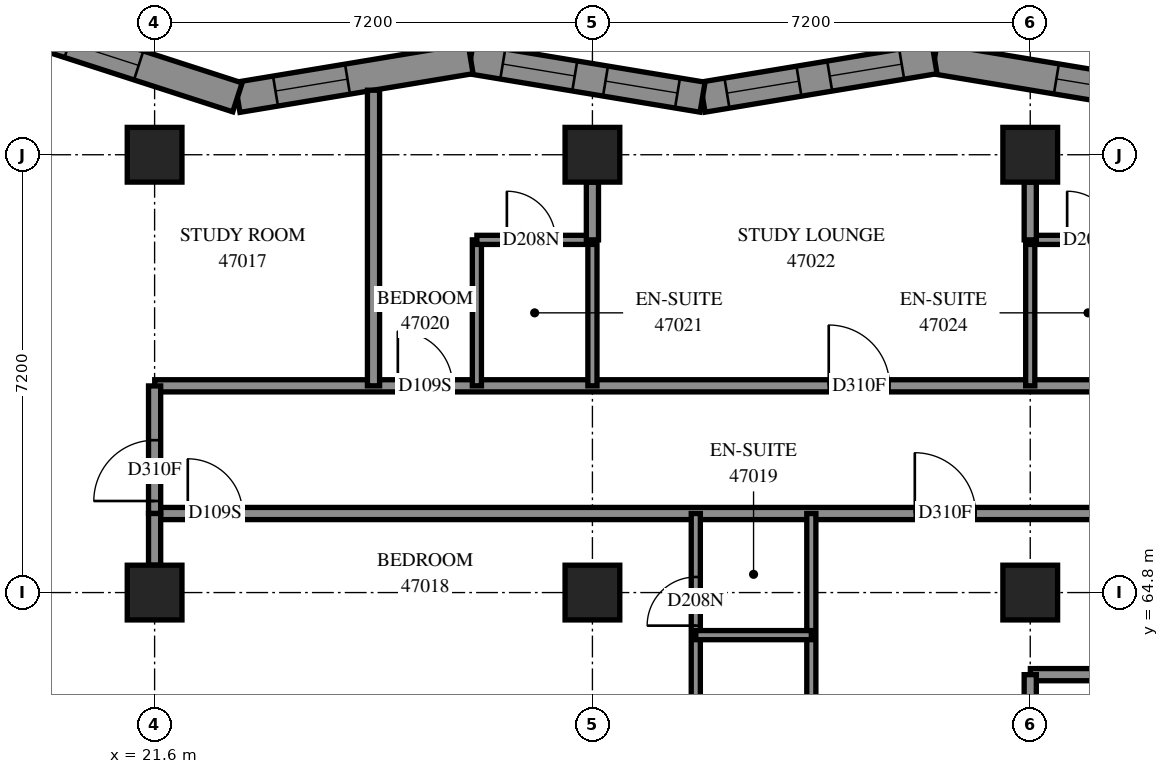
"""IFC4 building model, lengths in metres.
Left out: names, types, materials, properties, quantities, classifications, styles, units other than length and angle.
Written with IfcOpenShell. Run it as: python <this file> out.ifc"""

import sys

from ifc_helpers import new_model, si_unit, direction, frame, frame_2d, origin, origin_2d, place, context, subcontext, project, spatial, polyline, rectangle, outline, extrude, element, fill, save


model = new_model("IFC4")
c1 = context("Model", 3, precision=1e-05, world=origin(), true_north=direction((0.0, 1.0)))
c2 = subcontext(c1, "Body", "Model", "MODEL_VIEW")
j1 = project(units=[si_unit("LENGTHUNIT", "METRE"), si_unit("PLANEANGLEUNIT", "RADIAN")], contexts=[c1])
p1 = place(None, origin())
s1 = spatial("IfcSite", under=j1, at=p1, CompositionType="ELEMENT")
p2 = place(p1, origin())
s2 = spatial("IfcBuilding", under=s1, at=p2, CompositionType="ELEMENT")
p3 = place(p2, frame((0.0, 0.0, 172.8)))
s3 = spatial("IfcBuildingStorey", under=s2, at=p3, CompositionType="ELEMENT", Elevation=172.8)
for number, where, z_axis, x_axis in (
    (1, (21.6, 64.8, 0.0), (0.0, 0.0, 1.0), (1.0, 0.0, 0.0)),
    (2, (21.6, 72.0, 0.0), (0.0, 0.0, 1.0), (1.0, 0.0, 0.0)),
    (3, (28.8, 64.8, 0.0), (0.0, 0.0, 1.0), (1.0, 0.0, 0.0)),
    (4, (28.8, 72.0, 0.0), (0.0, 0.0, 1.0), (1.0, 0.0, 0.0)),
    (5, (36.0, 64.8, 0.0), (0.0, 0.0, 1.0), (1.0, 0.0, 0.0)),
    (6, (36.0, 72.0, 0.0), (0.0, 0.0, 1.0), (1.0, 0.0, 0.0)),
):
    element("IfcColumn", number, at=place(p3, frame(where, z_axis=z_axis, x_axis=x_axis)), inside=s3, PredefinedType="COLUMN", context=c2, shape_type="SweptSolid", body=[
        extrude(rectangle(XDim=0.9, YDim=0.9, at=origin_2d()), origin(), (0.0, 0.0, 1.0), 3.1),
    ])
p4 = place(p3, frame((38.241, 72.947, 0.0), z_axis=(0.0, 0.0, 1.0), x_axis=(-0.9865110911, 0.1636944324, 0.0)))
e7 = element("IfcWall", 7, at=p4, inside=s3, PredefinedType="SOLIDWALL", context=c2, shape_type="SweptSolid", body=[
    extrude(outline(polyline([(0.042, -0.25), (3.908, -0.25), (3.825, 0.25), (-0.042, 0.25), (0.042, -0.25)])), origin(), (0.0, 0.0, 1.0), 3.1),
])
p5 = place(p4, frame((0.636, 0.0, 0.45)))
e8 = element("IfcOpeningElement", 8, at=p5, cuts=e7, PredefinedType="OPENING", context=c2, shape_type="SweptSolid", body=[
    extrude(rectangle(XDim=1.2, YDim=2.5, at=frame_2d((0.6, 1.25))), frame((0.0, 0.26, 0.0), z_axis=(0.0, -1.0, 0.0), x_axis=(1.0, 0.0, 0.0)), (0.0, 0.0, 1.0), 0.52),
])
p6 = place(p3, frame((34.426, 73.58, 0.0), z_axis=(0.0, 0.0, 1.0), x_axis=(-0.9865103981, -0.1636986085, 0.0)))
e9 = element("IfcWall", 9, at=p6, inside=s3, PredefinedType="SOLIDWALL", context=c2, shape_type="SweptSolid", body=[
    extrude(outline(polyline([(-0.042, -0.25), (3.825, -0.25), (3.908, 0.25), (0.042, 0.25), (-0.042, -0.25)])), origin(), (0.0, 0.0, 1.0), 3.1),
])
p7 = place(p6, frame((0.548, 0.0, 0.45)))
e10 = element("IfcOpeningElement", 10, at=p7, cuts=e9, PredefinedType="OPENING", context=c2, shape_type="SweptSolid", body=[
    extrude(rectangle(XDim=1.2, YDim=2.5, at=frame_2d((0.6, 1.25))), frame((0.0, 0.26, 0.0), z_axis=(0.0, -1.0, 0.0), x_axis=(1.0, 0.0, 0.0)), (0.0, 0.0, 1.0), 0.52),
])
p8 = place(p6, frame((2.26, 0.0, 0.45)))
e11 = element("IfcOpeningElement", 11, at=p8, cuts=e9, PredefinedType="OPENING", context=c2, shape_type="SweptSolid", body=[
    extrude(rectangle(XDim=1.2, YDim=2.5, at=frame_2d((0.6, 1.25))), frame((0.0, 0.26, 0.0), z_axis=(0.0, -1.0, 0.0), x_axis=(1.0, 0.0, 0.0)), (0.0, 0.0, 1.0), 0.52),
])
p9 = place(p3, frame((30.611, 72.947, 0.0), z_axis=(0.0, 0.0, 1.0), x_axis=(-0.9865110911, 0.1636944324, 0.0)))
e12 = element("IfcWall", 12, at=p9, inside=s3, PredefinedType="SOLIDWALL", context=c2, shape_type="SweptSolid", body=[
    extrude(outline(polyline([(0.042, -0.25), (3.908, -0.25), (3.825, 0.25), (-0.042, 0.25), (0.042, -0.25)])), origin(), (0.0, 0.0, 1.0), 3.1),
])
p10 = place(p9, frame((0.418, 0.0, 0.45)))
e13 = element("IfcOpeningElement", 13, at=p10, cuts=e12, PredefinedType="OPENING", context=c2, shape_type="SweptSolid", body=[
    extrude(rectangle(XDim=1.2, YDim=2.5, at=frame_2d((0.6, 1.25))), frame((0.0, 0.26, 0.0), z_axis=(0.0, -1.0, 0.0), x_axis=(1.0, 0.0, 0.0)), (0.0, 0.0, 1.0), 0.52),
])
p11 = place(p9, frame((2.131, 0.0, 0.45)))
e14 = element("IfcOpeningElement", 14, at=p11, cuts=e12, PredefinedType="OPENING", context=c2, shape_type="SweptSolid", body=[
    extrude(rectangle(XDim=1.2, YDim=2.5, at=frame_2d((0.6, 1.25))), frame((0.0, 0.26, 0.0), z_axis=(0.0, -1.0, 0.0), x_axis=(1.0, 0.0, 0.0)), (0.0, 0.0, 1.0), 0.52),
])
p12 = place(p3, frame((26.797, 73.58, 0.0), z_axis=(0.0, 0.0, 1.0), x_axis=(-0.986509816, -0.1637021166, 0.0)))
e15 = element("IfcWall", 15, at=p12, inside=s3, PredefinedType="SOLIDWALL", context=c2, shape_type="SweptSolid", body=[
    extrude(outline(polyline([(-0.042, -0.25), (3.825, -0.25), (3.947, 0.25), (0.042, 0.25), (-0.042, -0.25)])), origin(), (0.0, 0.0, 1.0), 3.1),
])
p13 = place(p12, frame((2.052, 0.0, 0.45)))
e16 = element("IfcOpeningElement", 16, at=p13, cuts=e15, PredefinedType="OPENING", context=c2, shape_type="SweptSolid", body=[
    extrude(rectangle(XDim=1.2, YDim=2.5, at=frame_2d((0.6, 1.25))), frame((0.0, 0.26, 0.0), z_axis=(0.0, -1.0, 0.0), x_axis=(1.0, 0.0, 0.0)), (0.0, 0.0, 1.0), 0.52),
])
p14 = place(p3, frame((22.963, 72.943, 0.0), z_axis=(0.0, 0.0, 1.0), x_axis=(-0.9515260861, 0.3075680535, 0.0)))
e17 = element("IfcWall", 17, at=p14, inside=s3, PredefinedType="SOLIDWALL", context=c2, shape_type="SweptSolid", body=[
    extrude(outline(polyline([(0.061, -0.25), (4.07, -0.25), (3.383, 0.25), (-0.061, 0.25), (0.061, -0.25)])), origin(), (0.0, 0.0, 1.0), 3.1),
])
p15 = place(p14, frame((1.708, 0.0, 0.45)))
e18 = element("IfcOpeningElement", 18, at=p15, cuts=e17, PredefinedType="OPENING", context=c2, shape_type="SweptSolid", body=[
    extrude(rectangle(XDim=1.2, YDim=2.5, at=frame_2d((0.6, 1.25))), frame((0.0, 0.26, 0.0), z_axis=(0.0, -1.0, 0.0), x_axis=(1.0, 0.0, 0.0)), (0.0, 0.0, 1.0), 0.52),
])
p16 = place(p3, frame((21.602, 68.2, 0.0), z_axis=(0.0, 0.0, 1.0), x_axis=(1.0, 0.0, 0.0)))
e19 = element("IfcWall", 19, at=p16, inside=s3, PredefinedType="PARTITIONING", context=c2, shape_type="SweptSolid", body=[
    extrude(rectangle(XDim=19.048, YDim=0.2, at=frame_2d((9.524, 0.0))), origin(), (0.0, 0.0, 1.0), 3.1),
])
p17 = place(p16, frame((3.998, 0.0, 0.0)))
e20 = element("IfcOpeningElement", 20, at=p17, cuts=e19, PredefinedType="OPENING", context=c2, shape_type="SweptSolid", body=[
    extrude(rectangle(XDim=0.9, YDim=2.1, at=frame_2d((0.45, 1.05))), frame((0.0, 0.11, 0.0), z_axis=(0.0, -1.0, 0.0), x_axis=(1.0, 0.0, 0.0)), (0.0, 0.0, 1.0), 0.22),
])
p18 = place(p16, frame((11.084, 0.0, 0.0)))
e21 = element("IfcOpeningElement", 21, at=p18, cuts=e19, PredefinedType="OPENING", context=c2, shape_type="SweptSolid", body=[
    extrude(rectangle(XDim=1.0, YDim=2.1, at=frame_2d((0.5, 1.05))), frame((0.0, 0.11, 0.0), z_axis=(0.0, -1.0, 0.0), x_axis=(1.0, 0.0, 0.0)), (0.0, 0.0, 1.0), 0.22),
])
p19 = place(p16, frame((16.748, 0.0, 0.0)))
e22 = element("IfcOpeningElement", 22, at=p19, cuts=e19, PredefinedType="OPENING", context=c2, shape_type="SweptSolid", body=[
    extrude(rectangle(XDim=0.9, YDim=2.1, at=frame_2d((0.45, 1.05))), frame((0.0, 0.11, 0.0), z_axis=(0.0, -1.0, 0.0), x_axis=(1.0, 0.0, 0.0)), (0.0, 0.0, 1.0), 0.22),
])
p20 = place(p3, frame((21.6, 66.1, 0.0), z_axis=(0.0, 0.0, 1.0), x_axis=(1.0, 0.0, 0.0)))
e23 = element("IfcWall", 23, at=p20, inside=s3, PredefinedType="PARTITIONING", context=c2, shape_type="SweptSolid", body=[
    extrude(rectangle(XDim=16.95, YDim=0.2, at=frame_2d((8.475, 0.0))), origin(), (0.0, 0.0, 1.0), 3.1),
])
p21 = place(p20, frame((0.546, 0.0, 0.0)))
e24 = element("IfcOpeningElement", 24, at=p21, cuts=e23, PredefinedType="OPENING", context=c2, shape_type="SweptSolid", body=[
    extrude(rectangle(XDim=0.9, YDim=2.1, at=frame_2d((0.45, 1.05))), frame((0.0, 0.11, 0.0), z_axis=(0.0, -1.0, 0.0), x_axis=(1.0, 0.0, 0.0)), (0.0, 0.0, 1.0), 0.22),
])
p22 = place(p20, frame((12.502, 0.0, 0.0)))
e25 = element("IfcOpeningElement", 25, at=p22, cuts=e23, PredefinedType="OPENING", context=c2, shape_type="SweptSolid", body=[
    extrude(rectangle(XDim=1.0, YDim=2.1, at=frame_2d((0.5, 1.05))), frame((0.0, 0.11, 0.0), z_axis=(0.0, -1.0, 0.0), x_axis=(1.0, 0.0, 0.0)), (0.0, 0.0, 1.0), 0.22),
])
p23 = place(p3, frame((25.2, 68.2, 0.0), z_axis=(0.0, 0.0, 1.0), x_axis=(0.0, 1.0, 0.0)))
e26 = element("IfcWall", 26, at=p23, inside=s3, PredefinedType="PARTITIONING", context=c2, shape_type="SweptSolid", body=[
    extrude(rectangle(XDim=4.861, YDim=0.2, at=frame_2d((2.431, 0.0))), origin(), (0.0, 0.0, 1.0), 3.1),
])
p24 = place(p3, frame((32.4, 62.867, 0.0), z_axis=(0.0, 0.0, 1.0), x_axis=(0.0, 1.0, 0.0)))
e27 = element("IfcWall", 27, at=p24, inside=s3, PredefinedType="PARTITIONING", context=c2, shape_type="SweptSolid", body=[
    extrude(rectangle(XDim=3.233, YDim=0.15, at=frame_2d((1.617, 0.0))), origin(), (0.0, 0.0, 1.0), 3.1),
])
p25 = place(p3, frame((30.5, 62.867, 0.0), z_axis=(0.0, 0.0, 1.0), x_axis=(0.0, 1.0, 0.0)))
e28 = element("IfcWall", 28, at=p25, inside=s3, PredefinedType="PARTITIONING", context=c2, shape_type="SweptSolid", body=[
    extrude(rectangle(XDim=3.233, YDim=0.15, at=frame_2d((1.617, 0.0))), origin(), (0.0, 0.0, 1.0), 3.1),
])
p26 = place(p25, frame((1.389, 0.0, 0.0)))
e29 = element("IfcOpeningElement", 29, at=p26, cuts=e28, PredefinedType="OPENING", context=c2, shape_type="SweptSolid", body=[
    extrude(rectangle(XDim=0.8, YDim=2.1, at=frame_2d((0.4, 1.05))), frame((0.0, 0.085, 0.0), z_axis=(0.0, -1.0, 0.0), x_axis=(1.0, 0.0, 0.0)), (0.0, 0.0, 1.0), 0.17),
])
p27 = place(p3, frame((36.002, 63.45, 0.0), z_axis=(0.0, 0.0, 1.0), x_axis=(1.0, 0.0, 0.0)))
e30 = element("IfcWall", 30, at=p27, inside=s3, PredefinedType="PARTITIONING", context=c2, shape_type="SweptSolid", body=[
    extrude(rectangle(XDim=2.548, YDim=0.2, at=frame_2d((1.274, 0.0))), origin(), (0.0, 0.0, 1.0), 3.1),
])
for number, where, z_axis, x_axis in (
    (31, (26.9, 68.2, 0.0), (0.0, 0.0, 1.0), (0.0, 1.0, 0.0)),
    (32, (28.8, 68.2, 0.0), (0.0, 0.0, 1.0), (0.0, 1.0, 0.0)),
    (33, (36.0, 68.2, 0.0), (0.0, 0.0, 1.0), (0.0, 1.0, 0.0)),
):
    element("IfcWall", number, at=place(p3, frame(where, z_axis=z_axis, x_axis=x_axis)), inside=s3, PredefinedType="PARTITIONING", context=c2, shape_type="SweptSolid", body=[
        extrude(rectangle(XDim=2.4, YDim=0.15, at=frame_2d((1.2, 0.0))), origin(), (0.0, 0.0, 1.0), 3.1),
    ])
p28 = place(p3, frame((36.0, 61.35, 0.0), z_axis=(0.0, 0.0, 1.0), x_axis=(0.0, 1.0, 0.0)))
e34 = element("IfcWall", 34, at=p28, inside=s3, PredefinedType="PARTITIONING", context=c2, shape_type="SweptSolid", body=[
    extrude(rectangle(XDim=2.1, YDim=0.2, at=frame_2d((1.05, 0.0))), origin(), (0.0, 0.0, 1.0), 2.6),
])
p29 = place(p3, frame((21.6, 66.1, 0.0), z_axis=(0.0, 0.0, 1.0), x_axis=(0.0, 1.0, 0.0)))
e35 = element("IfcWall", 35, at=p29, inside=s3, PredefinedType="PARTITIONING", context=c2, shape_type="SweptSolid", body=[
    extrude(rectangle(XDim=2.098, YDim=0.2, at=frame_2d((1.049, 0.0))), origin(), (0.0, 0.0, 1.0), 2.6),
])
p30 = place(p29, frame((0.206, 0.0, 0.0)))
e36 = element("IfcOpeningElement", 36, at=p30, cuts=e35, PredefinedType="OPENING", context=c2, shape_type="SweptSolid", body=[
    extrude(rectangle(XDim=1.0, YDim=2.1, at=frame_2d((0.5, 1.05))), frame((0.0, 0.11, 0.0), z_axis=(0.0, -1.0, 0.0), x_axis=(1.0, 0.0, 0.0)), (0.0, 0.0, 1.0), 0.22),
])
p31 = place(p3, frame((26.9, 70.6, 0.0), z_axis=(0.0, 0.0, 1.0), x_axis=(1.0, 0.0, 0.0)))
e37 = element("IfcWall", 37, at=p31, inside=s3, PredefinedType="PARTITIONING", context=c2, shape_type="SweptSolid", body=[
    extrude(rectangle(XDim=1.9, YDim=0.15, at=frame_2d((0.95, 0.0))), origin(), (0.0, 0.0, 1.0), 3.1),
])
p32 = place(p31, frame((0.493, 0.0, 0.0)))
e38 = element("IfcOpeningElement", 38, at=p32, cuts=e37, PredefinedType="OPENING", context=c2, shape_type="SweptSolid", body=[
    extrude(rectangle(XDim=0.8, YDim=2.1, at=frame_2d((0.4, 1.05))), frame((0.0, 0.085, 0.0), z_axis=(0.0, -1.0, 0.0), x_axis=(1.0, 0.0, 0.0)), (0.0, 0.0, 1.0), 0.17),
])
p33 = place(p3, frame((36.0, 70.6, 0.0), z_axis=(0.0, 0.0, 1.0), x_axis=(1.0, 0.0, 0.0)))
e39 = element("IfcWall", 39, at=p33, inside=s3, PredefinedType="PARTITIONING", context=c2, shape_type="SweptSolid", body=[
    extrude(rectangle(XDim=1.9, YDim=0.15, at=frame_2d((0.95, 0.0))), origin(), (0.0, 0.0, 1.0), 3.1),
])
p34 = place(p33, frame((0.607, 0.0, 0.0)))
e40 = element("IfcOpeningElement", 40, at=p34, cuts=e39, PredefinedType="OPENING", context=c2, shape_type="SweptSolid", body=[
    extrude(rectangle(XDim=0.8, YDim=2.1, at=frame_2d((0.4, 1.05))), frame((0.0, 0.085, 0.0), z_axis=(0.0, -1.0, 0.0), x_axis=(1.0, 0.0, 0.0)), (0.0, 0.0, 1.0), 0.17),
])
p35 = place(p3, frame((30.5, 64.1, 0.0), z_axis=(0.0, 0.0, 1.0), x_axis=(1.0, 0.0, 0.0)))
e41 = element("IfcWall", 41, at=p35, inside=s3, PredefinedType="PARTITIONING", context=c2, shape_type="SweptSolid", body=[
    extrude(rectangle(XDim=1.9, YDim=0.15, at=frame_2d((0.95, 0.0))), origin(), (0.0, 0.0, 1.0), 3.1),
])
for number, where, z_axis, x_axis in (
    (42, (28.8, 70.6, 0.0), (0.0, 0.0, 1.0), (0.0, 1.0, 0.0)),
    (43, (36.0, 70.6, 0.0), (0.0, 0.0, 1.0), (0.0, 1.0, 0.0)),
):
    element("IfcWall", number, at=place(p3, frame(where, z_axis=z_axis, x_axis=x_axis)), inside=s3, PredefinedType="PARTITIONING", context=c2, shape_type="SweptSolid", body=[
        extrude(rectangle(XDim=0.95, YDim=0.2, at=frame_2d((0.475, 0.0))), origin(), (0.0, 0.0, 1.0), 3.1),
    ])
p36 = place(p3, frame((21.6, 65.25, 0.0), z_axis=(0.0, 0.0, 1.0), x_axis=(0.0, 1.0, 0.0)))
e44 = element("IfcWall", 44, at=p36, inside=s3, PredefinedType="PARTITIONING", context=c2, shape_type="SweptSolid", body=[
    extrude(rectangle(XDim=0.85, YDim=0.2, at=frame_2d((0.425, 0.0))), origin(), (0.0, 0.0, 1.0), 2.6),
])
p37 = place(p5, origin())
e45 = element("IfcWindow", 45, at=p37, inside=s3, PartitioningType="SINGLE_PANEL", PredefinedType="WINDOW", context=c2, shape_type="SweptSolid", body=[
    extrude(rectangle(XDim=1.2, YDim=2.5, at=frame_2d((0.6, 1.25))), frame((0.0, 0.18, 0.0), z_axis=(0.0, -1.0, 0.0), x_axis=(1.0, 0.0, 0.0)), (0.0, 0.0, 1.0), 0.06),
])
fill(e8, e45)
p38 = place(p7, origin())
e46 = element("IfcWindow", 46, at=p38, inside=s3, PartitioningType="SINGLE_PANEL", PredefinedType="WINDOW", context=c2, shape_type="SweptSolid", body=[
    extrude(rectangle(XDim=1.2, YDim=2.5, at=frame_2d((0.6, 1.25))), frame((0.0, 0.18, 0.0), z_axis=(0.0, -1.0, 0.0), x_axis=(1.0, 0.0, 0.0)), (0.0, 0.0, 1.0), 0.06),
])
fill(e10, e46)
p39 = place(p8, origin())
e47 = element("IfcWindow", 47, at=p39, inside=s3, PartitioningType="SINGLE_PANEL", PredefinedType="WINDOW", context=c2, shape_type="SweptSolid", body=[
    extrude(rectangle(XDim=1.2, YDim=2.5, at=frame_2d((0.6, 1.25))), frame((0.0, 0.18, 0.0), z_axis=(0.0, -1.0, 0.0), x_axis=(1.0, 0.0, 0.0)), (0.0, 0.0, 1.0), 0.06),
])
fill(e11, e47)
p40 = place(p10, origin())
e48 = element("IfcWindow", 48, at=p40, inside=s3, PartitioningType="SINGLE_PANEL", PredefinedType="WINDOW", context=c2, shape_type="SweptSolid", body=[
    extrude(rectangle(XDim=1.2, YDim=2.5, at=frame_2d((0.6, 1.25))), frame((0.0, 0.18, 0.0), z_axis=(0.0, -1.0, 0.0), x_axis=(1.0, 0.0, 0.0)), (0.0, 0.0, 1.0), 0.06),
])
fill(e13, e48)
p41 = place(p11, origin())
e49 = element("IfcWindow", 49, at=p41, inside=s3, PartitioningType="SINGLE_PANEL", PredefinedType="WINDOW", context=c2, shape_type="SweptSolid", body=[
    extrude(rectangle(XDim=1.2, YDim=2.5, at=frame_2d((0.6, 1.25))), frame((0.0, 0.18, 0.0), z_axis=(0.0, -1.0, 0.0), x_axis=(1.0, 0.0, 0.0)), (0.0, 0.0, 1.0), 0.06),
])
fill(e14, e49)
p42 = place(p13, origin())
e50 = element("IfcWindow", 50, at=p42, inside=s3, PartitioningType="SINGLE_PANEL", PredefinedType="WINDOW", context=c2, shape_type="SweptSolid", body=[
    extrude(rectangle(XDim=1.2, YDim=2.5, at=frame_2d((0.6, 1.25))), frame((0.0, 0.18, 0.0), z_axis=(0.0, -1.0, 0.0), x_axis=(1.0, 0.0, 0.0)), (0.0, 0.0, 1.0), 0.06),
])
fill(e16, e50)
p43 = place(p15, origin())
e51 = element("IfcWindow", 51, at=p43, inside=s3, PartitioningType="SINGLE_PANEL", PredefinedType="WINDOW", context=c2, shape_type="SweptSolid", body=[
    extrude(rectangle(XDim=1.2, YDim=2.5, at=frame_2d((0.6, 1.25))), frame((0.0, 0.18, 0.0), z_axis=(0.0, -1.0, 0.0), x_axis=(1.0, 0.0, 0.0)), (0.0, 0.0, 1.0), 0.06),
])
fill(e18, e51)
p44 = place(p30, origin())
e52 = element("IfcDoor", 52, at=p44, inside=s3, OperationType="SINGLE_SWING_RIGHT", PredefinedType="DOOR", context=c2, shape_type="SweptSolid", body=[
    extrude(rectangle(XDim=1.0, YDim=2.1, at=frame_2d((0.5, 1.05))), frame((0.0, 0.025, 0.0), z_axis=(0.0, -1.0, 0.0), x_axis=(1.0, 0.0, 0.0)), (0.0, 0.0, 1.0), 0.05),
])
fill(e36, e52)
p45 = place(p21, origin())
e53 = element("IfcDoor", 53, at=p45, inside=s3, OperationType="SINGLE_SWING_LEFT", PredefinedType="DOOR", context=c2, shape_type="SweptSolid", body=[
    extrude(rectangle(XDim=0.9, YDim=2.1, at=frame_2d((0.45, 1.05))), frame((0.0, 0.025, 0.0), z_axis=(0.0, -1.0, 0.0), x_axis=(1.0, 0.0, 0.0)), (0.0, 0.0, 1.0), 0.05),
])
fill(e24, e53)
p46 = place(p26, origin())
e54 = element("IfcDoor", 54, at=p46, inside=s3, OperationType="SINGLE_SWING_RIGHT", PredefinedType="DOOR", context=c2, shape_type="SweptSolid", body=[
    extrude(rectangle(XDim=0.8, YDim=2.1, at=frame_2d((0.4, 1.05))), frame((0.0, 0.025, 0.0), z_axis=(0.0, -1.0, 0.0), x_axis=(1.0, 0.0, 0.0)), (0.0, 0.0, 1.0), 0.05),
])
fill(e29, e54)
p47 = place(p17, origin())
e55 = element("IfcDoor", 55, at=p47, inside=s3, OperationType="SINGLE_SWING_LEFT", PredefinedType="DOOR", context=c2, shape_type="SweptSolid", body=[
    extrude(rectangle(XDim=0.9, YDim=2.1, at=frame_2d((0.45, 1.05))), frame((0.0, 0.025, 0.0), z_axis=(0.0, -1.0, 0.0), x_axis=(1.0, 0.0, 0.0)), (0.0, 0.0, 1.0), 0.05),
])
fill(e20, e55)
p48 = place(p32, origin())
e56 = element("IfcDoor", 56, at=p48, inside=s3, OperationType="SINGLE_SWING_RIGHT", PredefinedType="DOOR", context=c2, shape_type="SweptSolid", body=[
    extrude(rectangle(XDim=0.8, YDim=2.1, at=frame_2d((0.4, 1.05))), frame((0.0, 0.025, 0.0), z_axis=(0.0, -1.0, 0.0), x_axis=(1.0, 0.0, 0.0)), (0.0, 0.0, 1.0), 0.05),
])
fill(e38, e56)
p49 = place(p18, origin())
e57 = element("IfcDoor", 57, at=p49, inside=s3, OperationType="SINGLE_SWING_RIGHT", PredefinedType="DOOR", context=c2, shape_type="SweptSolid", body=[
    extrude(rectangle(XDim=1.0, YDim=2.1, at=frame_2d((0.5, 1.05))), frame((0.0, 0.025, 0.0), z_axis=(0.0, -1.0, 0.0), x_axis=(1.0, 0.0, 0.0)), (0.0, 0.0, 1.0), 0.05),
])
fill(e21, e57)
p50 = place(p34, origin())
e58 = element("IfcDoor", 58, at=p50, inside=s3, OperationType="SINGLE_SWING_RIGHT", PredefinedType="DOOR", context=c2, shape_type="SweptSolid", body=[
    extrude(rectangle(XDim=0.8, YDim=2.1, at=frame_2d((0.4, 1.05))), frame((0.0, 0.025, 0.0), z_axis=(0.0, -1.0, 0.0), x_axis=(1.0, 0.0, 0.0)), (0.0, 0.0, 1.0), 0.05),
])
fill(e40, e58)
p51 = place(p22, origin())
e59 = element("IfcDoor", 59, at=p51, inside=s3, OperationType="SINGLE_SWING_RIGHT", PredefinedType="DOOR", context=c2, shape_type="SweptSolid", body=[
    extrude(rectangle(XDim=1.0, YDim=2.1, at=frame_2d((0.5, 1.05))), frame((0.0, 0.025, 0.0), z_axis=(0.0, -1.0, 0.0), x_axis=(1.0, 0.0, 0.0)), (0.0, 0.0, 1.0), 0.05),
])
fill(e25, e59)
save(model, sys.argv[1])
